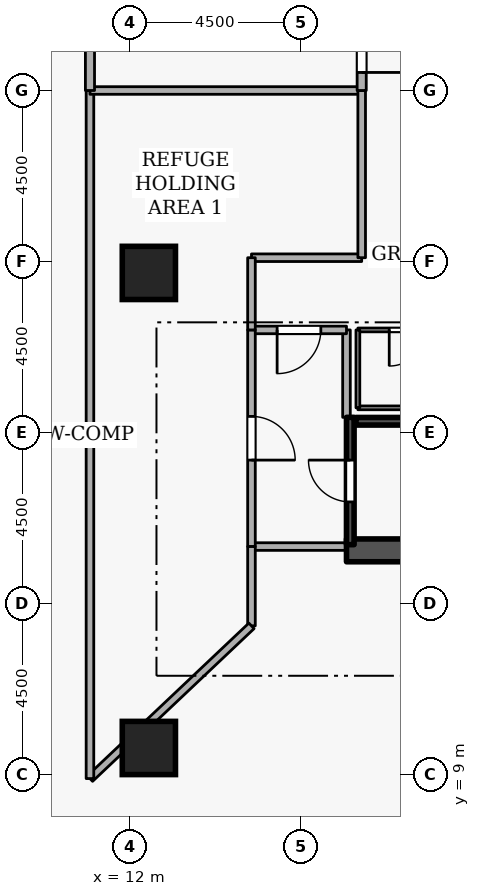
"""IFC4 building model, lengths in metres.
Left out: names, types, materials, properties, quantities, classifications, styles, units other than length and angle.
Written with IfcOpenShell. Run it as: python <this file> out.ifc"""

import sys

from ifc_helpers import new_model, si_unit, direction, frame, frame_2d, origin, origin_2d, place, context, subcontext, project, spatial, rectangle, extrude, element, fill, save


model = new_model("IFC4")
c1 = context("Model", 3, precision=1e-05, world=origin(), true_north=direction((0.0, 1.0)))
c2 = subcontext(c1, "Body", "Model", "MODEL_VIEW")
j1 = project(units=[si_unit("LENGTHUNIT", "METRE"), si_unit("PLANEANGLEUNIT", "RADIAN")], contexts=[c1])
p1 = place(None, origin())
s1 = spatial("IfcSite", under=j1, at=p1, CompositionType="ELEMENT")
p2 = place(p1, origin())
s2 = spatial("IfcBuilding", under=s1, at=p2, CompositionType="ELEMENT")
p3 = place(p2, frame((0.0, 0.0, 71.7)))
s3 = spatial("IfcBuildingStorey", under=s2, at=p3, CompositionType="ELEMENT", Elevation=71.7)
p4 = place(p3, frame((17.7, 14.9, 0.0), z_axis=(0.0, 0.0, 1.0), x_axis=(1.0, 0.0, 0.0)))
e1 = element("IfcWall", 1, at=p4, inside=s3, PredefinedType="SHEAR", context=c2, shape_type="SweptSolid", body=[
    extrude(rectangle(XDim=15.6, YDim=0.6, at=frame_2d((7.8, 0.0))), origin(), (0.0, 0.0, 1.0), 4.2),
])
for number, where, z_axis, x_axis in (
    (2, (12.5, 9.7, 0.0), (0.0, 0.0, 1.0), (1.0, 0.0, 0.0)),
    (3, (12.5, 22.2, 0.0), (0.0, 0.0, 1.0), (1.0, 0.0, 0.0)),
):
    element("IfcColumn", number, at=place(p3, frame(where, z_axis=z_axis, x_axis=x_axis)), inside=s3, PredefinedType="COLUMN", context=c2, shape_type="SweptSolid", body=[
        extrude(rectangle(XDim=1.4, YDim=1.4, at=origin_2d()), origin(), (0.0, 0.0, 1.0), 4.2),
    ])
p5 = place(p3, frame((17.8, 15.05, 0.0), z_axis=(0.0, 0.0, 1.0), x_axis=(0.0, 1.0, 0.0)))
e4 = element("IfcWall", 4, at=p5, inside=s3, PredefinedType="SHEAR", context=c2, shape_type="SweptSolid", body=[
    extrude(rectangle(XDim=3.35, YDim=0.2, at=frame_2d((1.675, 0.0))), origin(), (0.0, 0.0, 1.0), 4.2),
])
p6 = place(p5, frame((1.125, 0.0, 0.0)))
e5 = element("IfcOpeningElement", 5, at=p6, cuts=e4, PredefinedType="OPENING", context=c2, shape_type="SweptSolid", body=[
    extrude(rectangle(XDim=1.1, YDim=2.1, at=frame_2d((0.55, 1.05))), frame((0.0, 0.11, 0.0), z_axis=(0.0, -1.0, 0.0), x_axis=(1.0, 0.0, 0.0)), (0.0, 0.0, 1.0), 0.22),
])
p7 = place(p3, frame((25.05, 18.297, 0.0), z_axis=(0.0, 0.0, 1.0), x_axis=(-1.0, 0.0, 0.0)))
e6 = element("IfcWall", 6, at=p7, inside=s3, PredefinedType="SHEAR", context=c2, shape_type="SweptSolid", body=[
    extrude(rectangle(XDim=7.1, YDim=0.2, at=frame_2d((3.55, 0.0))), origin(), (0.0, 0.0, 1.0), 4.2),
])
p8 = place(p3, frame((15.2, 15.0, 0.0), z_axis=(0.0, 0.0, 1.0), x_axis=(1.0, 0.0, 0.0)))
e7 = element("IfcWall", 7, at=p8, inside=s3, PredefinedType="STANDARD", context=c2, shape_type="SweptSolid", body=[
    extrude(rectangle(XDim=2.5, YDim=0.2, at=frame_2d((1.25, 0.0))), origin(), (0.0, 0.0, 1.0), 3.86),
])
p9 = place(p3, frame((17.7, 18.4, 0.0), z_axis=(0.0, 0.0, 1.0), x_axis=(0.0, 1.0, 0.0)))
e8 = element("IfcWall", 8, at=p9, inside=s3, PredefinedType="STANDARD", context=c2, shape_type="SweptSolid", body=[
    extrude(rectangle(XDim=2.3, YDim=0.2, at=frame_2d((1.15, 0.0))), origin(), (0.0, 0.0, 1.0), 3.065),
])
p10 = place(p3, frame((17.7, 20.7, 0.0), z_axis=(0.0, 0.0, 1.0), x_axis=(-1.0, 0.0, 0.0)))
e9 = element("IfcWall", 9, at=p10, inside=s3, PredefinedType="STANDARD", context=c2, shape_type="SweptSolid", body=[
    extrude(rectangle(XDim=2.5, YDim=0.2, at=frame_2d((1.25, 0.0))), origin(), (0.0, 0.0, 1.0), 3.86),
])
p11 = place(p10, frame((0.675, 0.0, 0.0)))
e10 = element("IfcOpeningElement", 10, at=p11, cuts=e9, PredefinedType="OPENING", context=c2, shape_type="SweptSolid", body=[
    extrude(rectangle(XDim=1.15, YDim=2.1, at=frame_2d((0.575, 1.05))), frame((0.0, 0.11, 0.0), z_axis=(0.0, -1.0, 0.0), x_axis=(1.0, 0.0, 0.0)), (0.0, 0.0, 1.0), 0.22),
])
p12 = place(p3, frame((15.2, 20.7, 0.0), z_axis=(0.0, 0.0, 1.0), x_axis=(0.0, -1.0, 0.0)))
e11 = element("IfcWall", 11, at=p12, inside=s3, PredefinedType="STANDARD", context=c2, shape_type="SweptSolid", body=[
    extrude(rectangle(XDim=5.7, YDim=0.2, at=frame_2d((2.85, 0.0))), origin(), (0.0, 0.0, 1.0), 3.86),
])
p13 = place(p12, frame((2.275, 0.0, 0.0)))
e12 = element("IfcOpeningElement", 12, at=p13, cuts=e11, PredefinedType="OPENING", context=c2, shape_type="SweptSolid", body=[
    extrude(rectangle(XDim=1.15, YDim=2.1, at=frame_2d((0.575, 1.05))), frame((0.0, 0.11, 0.0), z_axis=(0.0, -1.0, 0.0), x_axis=(1.0, 0.0, 0.0)), (0.0, 0.0, 1.0), 0.22),
])
p14 = place(p3, frame((18.1, 22.6, 0.0), z_axis=(0.0, 0.0, 1.0), x_axis=(-1.0, 0.0, 0.0)))
e13 = element("IfcWall", 13, at=p14, inside=s3, PredefinedType="STANDARD", context=c2, shape_type="SweptSolid", body=[
    extrude(rectangle(XDim=2.9, YDim=0.2, at=frame_2d((1.45, 0.0))), origin(), (0.0, 0.0, 1.0), 3.86),
])
p15 = place(p3, frame((15.2, 22.6, 0.0), z_axis=(0.0, 0.0, 1.0), x_axis=(0.0, -1.0, 0.0)))
e14 = element("IfcWall", 14, at=p15, inside=s3, PredefinedType="STANDARD", context=c2, shape_type="SweptSolid", body=[
    extrude(rectangle(XDim=1.9, YDim=0.2, at=frame_2d((0.95, 0.0))), origin(), (0.0, 0.0, 1.0), 3.86),
])
p16 = place(p3, frame((15.2, 15.0, 0.0), z_axis=(0.0, 0.0, 1.0), x_axis=(0.0, -1.0, 0.0)))
e15 = element("IfcWall", 15, at=p16, inside=s3, PredefinedType="STANDARD", context=c2, shape_type="SweptSolid", body=[
    extrude(rectangle(XDim=2.087, YDim=0.2, at=frame_2d((1.043, 0.0))), origin(), (0.0, 0.0, 1.0), 3.86),
])
p17 = place(p3, frame((15.2, 12.913, 0.0), z_axis=(0.0, 0.0, 1.0), x_axis=(-0.726635667089, -0.687023003482, 0.0)))
e16 = element("IfcWall", 16, at=p17, inside=s3, PredefinedType="STANDARD", context=c2, shape_type="SweptSolid", body=[
    extrude(rectangle(XDim=5.849, YDim=0.2, at=frame_2d((2.924, 0.0))), origin(), (0.0, 0.0, 1.0), 3.86),
])
p18 = place(p3, frame((10.95, 8.895, 0.0), z_axis=(0.0, 0.0, 1.0), x_axis=(0.0, 1.0, 0.0)))
e17 = element("IfcWall", 17, at=p18, inside=s3, PredefinedType="STANDARD", context=c2, shape_type="SweptSolid", body=[
    extrude(rectangle(XDim=18.105, YDim=0.2, at=frame_2d((9.052, 0.0))), origin(), (0.0, 0.0, 1.0), 3.365),
])
p19 = place(p3, frame((10.95, 27.0, 0.0), z_axis=(0.0, 0.0, 1.0), x_axis=(1.0, 0.0, 0.0)))
e18 = element("IfcWall", 18, at=p19, inside=s3, PredefinedType="STANDARD", context=c2, shape_type="SweptSolid", body=[
    extrude(rectangle(XDim=7.15, YDim=0.2, at=frame_2d((3.575, 0.0))), origin(), (0.0, 0.0, 1.0), 3.245),
])
p20 = place(p3, frame((18.1, 27.0, 0.0), z_axis=(0.0, 0.0, 1.0), x_axis=(0.0, -1.0, 0.0)))
e19 = element("IfcWall", 19, at=p20, inside=s3, PredefinedType="STANDARD", context=c2, shape_type="SweptSolid", body=[
    extrude(rectangle(XDim=4.4, YDim=0.2, at=frame_2d((2.2, 0.0))), origin(), (0.0, 0.0, 1.0), 3.065),
])
p21 = place(p3, frame((10.95, 27.0, 0.0), z_axis=(0.0, 0.0, 1.0), x_axis=(0.0, 1.0, 0.0)))
e20 = element("IfcWall", 20, at=p21, inside=s3, PredefinedType="STANDARD", context=c2, shape_type="SweptSolid", body=[
    extrude(rectangle(XDim=2.15, YDim=0.24, at=frame_2d((1.075, 0.0))), origin(), (0.0, 0.0, 1.0), 3.86),
])
p22 = place(p3, frame((18.1, 29.15, 0.0), z_axis=(0.0, 0.0, 1.0), x_axis=(0.0, -1.0, 0.0)))
e21 = element("IfcWall", 21, at=p22, inside=s3, PredefinedType="STANDARD", context=c2, shape_type="SweptSolid", body=[
    extrude(rectangle(XDim=2.15, YDim=0.24, at=frame_2d((1.075, 0.0))), origin(), (0.0, 0.0, 1.0), 3.065),
])
p23 = place(p22, frame((0.475, 0.0, 0.0)))
e22 = element("IfcOpeningElement", 22, at=p23, cuts=e21, PredefinedType="OPENING", context=c2, shape_type="SweptSolid", body=[
    extrude(rectangle(XDim=1.2, YDim=2.1, at=frame_2d((0.6, 1.05))), frame((0.0, 0.13, 0.0), z_axis=(0.0, -1.0, 0.0), x_axis=(1.0, 0.0, 0.0)), (0.0, 0.0, 1.0), 0.26),
])
p24 = place(p3, frame((18.0, 18.65, 0.0), z_axis=(0.0, 0.0, 1.0), x_axis=(1.0, 0.0, 0.0)))
e23 = element("IfcWall", 23, at=p24, inside=s3, PredefinedType="PARTITIONING", context=c2, shape_type="SweptSolid", body=[
    extrude(rectangle(XDim=2.6, YDim=0.1, at=frame_2d((1.3, 0.0))), origin(), (0.0, 0.0, 1.0), 3.86),
])
p25 = place(p3, frame((20.6, 20.7, 0.0), z_axis=(0.0, 0.0, 1.0), x_axis=(-1.0, 0.0, 0.0)))
e24 = element("IfcWall", 24, at=p25, inside=s3, PredefinedType="PARTITIONING", context=c2, shape_type="SweptSolid", body=[
    extrude(rectangle(XDim=2.6, YDim=0.1, at=frame_2d((1.3, 0.0))), origin(), (0.0, 0.0, 1.0), 3.86),
])
p26 = place(p25, frame((0.825, 0.0, 0.0)))
e25 = element("IfcOpeningElement", 25, at=p26, cuts=e24, PredefinedType="OPENING", context=c2, shape_type="SweptSolid", body=[
    extrude(rectangle(XDim=0.95, YDim=2.1, at=frame_2d((0.475, 1.05))), frame((0.0, 0.06, 0.0), z_axis=(0.0, -1.0, 0.0), x_axis=(1.0, 0.0, 0.0)), (0.0, 0.0, 1.0), 0.12),
])
p27 = place(p3, frame((18.0, 20.7, 0.0), z_axis=(0.0, 0.0, 1.0), x_axis=(0.0, -1.0, 0.0)))
e26 = element("IfcWall", 26, at=p27, inside=s3, PredefinedType="PARTITIONING", context=c2, shape_type="SweptSolid", body=[
    extrude(rectangle(XDim=2.05, YDim=0.1, at=frame_2d((1.025, 0.0))), origin(), (0.0, 0.0, 1.0), 3.065),
])
p28 = place(p6, origin())
e27 = element("IfcDoor", 27, at=p28, inside=s3, OperationType="SINGLE_SWING_RIGHT", PredefinedType="DOOR", context=c2, shape_type="SweptSolid", body=[
    extrude(rectangle(XDim=1.1, YDim=2.1, at=frame_2d((0.55, 1.05))), frame((0.0, 0.025, 0.0), z_axis=(0.0, -1.0, 0.0), x_axis=(1.0, 0.0, 0.0)), (0.0, 0.0, 1.0), 0.05),
])
fill(e5, e27)
p29 = place(p11, origin())
e28 = element("IfcDoor", 28, at=p29, inside=s3, OperationType="SINGLE_SWING_RIGHT", PredefinedType="DOOR", context=c2, shape_type="SweptSolid", body=[
    extrude(rectangle(XDim=1.15, YDim=2.1, at=frame_2d((0.575, 1.05))), frame((0.0, 0.025, 0.0), z_axis=(0.0, -1.0, 0.0), x_axis=(1.0, 0.0, 0.0)), (0.0, 0.0, 1.0), 0.05),
])
fill(e10, e28)
p30 = place(p26, origin())
e29 = element("IfcDoor", 29, at=p30, inside=s3, OperationType="SINGLE_SWING_RIGHT", PredefinedType="DOOR", context=c2, shape_type="SweptSolid", body=[
    extrude(rectangle(XDim=0.95, YDim=2.1, at=frame_2d((0.475, 1.05))), frame((0.0, 0.025, 0.0), z_axis=(0.0, -1.0, 0.0), x_axis=(1.0, 0.0, 0.0)), (0.0, 0.0, 1.0), 0.05),
])
fill(e25, e29)
p31 = place(p13, origin())
e30 = element("IfcDoor", 30, at=p31, inside=s3, OperationType="SINGLE_SWING_RIGHT", PredefinedType="DOOR", context=c2, shape_type="SweptSolid", body=[
    extrude(rectangle(XDim=1.15, YDim=2.1, at=frame_2d((0.575, 1.05))), frame((0.0, 0.025, 0.0), z_axis=(0.0, -1.0, 0.0), x_axis=(1.0, 0.0, 0.0)), (0.0, 0.0, 1.0), 0.05),
])
fill(e12, e30)
p32 = place(p23, origin())
e31 = element("IfcDoor", 31, at=p32, inside=s3, OperationType="SINGLE_SWING_RIGHT", PredefinedType="DOOR", context=c2, shape_type="SweptSolid", body=[
    extrude(rectangle(XDim=1.2, YDim=2.1, at=frame_2d((0.6, 1.05))), frame((0.0, 0.025, 0.0), z_axis=(0.0, -1.0, 0.0), x_axis=(1.0, 0.0, 0.0)), (0.0, 0.0, 1.0), 0.05),
])
fill(e22, e31)
save(model, sys.argv[1])
